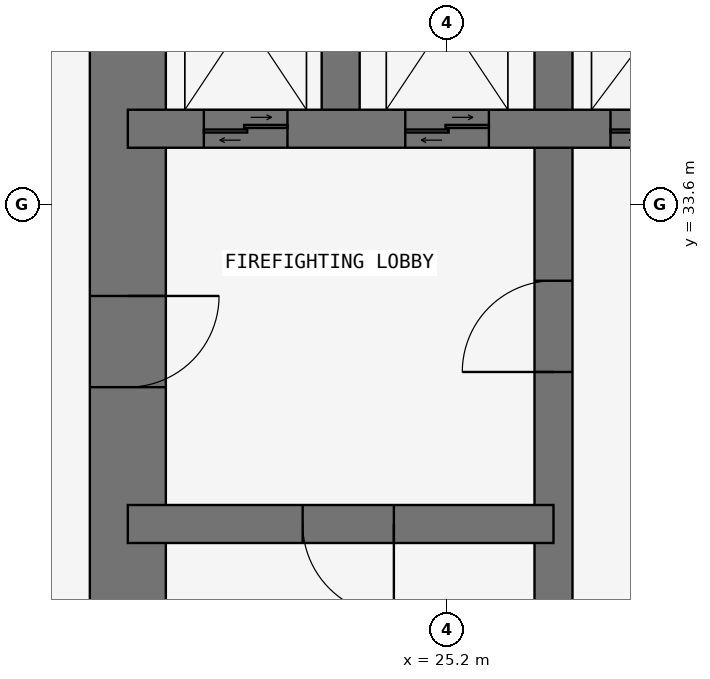
"""IFC4 building model, lengths in metres.
Left out: names, types, materials, properties, quantities, classifications, styles, units other than length and angle.
Written with IfcOpenShell. Run it as: python <this file> out.ifc"""

import sys

from ifc_helpers import new_model, si_unit, direction, frame, frame_2d, origin, place, context, subcontext, project, spatial, rectangle, extrude, element, fill, save


model = new_model("IFC4")
c1 = context("Model", 3, precision=1e-05, world=origin(), true_north=direction((0.0, 1.0)))
c2 = subcontext(c1, "Body", "Model", "MODEL_VIEW")
j1 = project(units=[si_unit("LENGTHUNIT", "METRE"), si_unit("PLANEANGLEUNIT", "RADIAN")], contexts=[c1])
p1 = place(None, origin())
s1 = spatial("IfcSite", under=j1, at=p1, CompositionType="ELEMENT")
p2 = place(p1, origin())
s2 = spatial("IfcBuilding", under=s1, at=p2, CompositionType="ELEMENT")
p3 = place(p2, frame((0.0, 0.0, 84.9)))
s3 = spatial("IfcBuildingStorey", under=s2, at=p3, CompositionType="ELEMENT", Elevation=84.9)
p4 = place(p3, frame((21.0, 37.8, 0.0), z_axis=(0.0, 0.0, 1.0), x_axis=(0.0, -1.0, 0.0)))
e1 = element("IfcWall", 1, at=p4, inside=s3, PredefinedType="SHEAR", context=c2, shape_type="SweptSolid", body=[
    extrude(rectangle(XDim=17.3, YDim=1.0, at=frame_2d((8.65, 0.0))), origin(), (0.0, 0.0, 1.0), 3.6),
])
p5 = place(p4, frame((5.4, 0.0, 0.0)))
e2 = element("IfcOpeningElement", 2, at=p5, cuts=e1, PredefinedType="OPENING", context=c2, shape_type="SweptSolid", body=[
    extrude(rectangle(XDim=1.2, YDim=2.1, at=frame_2d((0.6, 1.05))), frame((0.0, 0.51, 0.0), z_axis=(0.0, -1.0, 0.0), x_axis=(1.0, 0.0, 0.0)), (0.0, 0.0, 1.0), 1.02),
])
p6 = place(p3, frame((26.6, 21.0, 0.0), z_axis=(0.0, 0.0, 1.0), x_axis=(0.0, 1.0, 0.0)))
e3 = element("IfcWall", 3, at=p6, inside=s3, PredefinedType="SHEAR", context=c2, shape_type="SweptSolid", body=[
    extrude(rectangle(XDim=16.8, YDim=0.5, at=frame_2d((8.4, 0.0))), origin(), (0.0, 0.0, 1.0), 3.6),
])
p7 = place(p6, frame((10.4, 0.0, 0.0)))
e4 = element("IfcOpeningElement", 4, at=p7, cuts=e3, PredefinedType="OPENING", context=c2, shape_type="SweptSolid", body=[
    extrude(rectangle(XDim=1.2, YDim=2.1, at=frame_2d((0.6, 1.05))), frame((0.0, 0.26, 0.0), z_axis=(0.0, -1.0, 0.0), x_axis=(1.0, 0.0, 0.0)), (0.0, 0.0, 1.0), 0.52),
])
p8 = place(p3, frame((21.0, 29.4, 0.0), z_axis=(0.0, 0.0, 1.0), x_axis=(1.0, 0.0, 0.0)))
e5 = element("IfcWall", 5, at=p8, inside=s3, PredefinedType="SHEAR", context=c2, shape_type="SweptSolid", body=[
    extrude(rectangle(XDim=5.6, YDim=0.5, at=frame_2d((2.8, 0.0))), origin(), (0.0, 0.0, 1.0), 3.6),
])
p9 = place(p8, frame((2.3, 0.0, 0.0)))
e6 = element("IfcOpeningElement", 6, at=p9, cuts=e5, PredefinedType="OPENING", context=c2, shape_type="SweptSolid", body=[
    extrude(rectangle(XDim=1.2, YDim=2.1, at=frame_2d((0.6, 1.05))), frame((0.0, 0.26, 0.0), z_axis=(0.0, -1.0, 0.0), x_axis=(1.0, 0.0, 0.0)), (0.0, 0.0, 1.0), 0.52),
])
p10 = place(p3, frame((21.0, 34.6, 0.0), z_axis=(0.0, 0.0, 1.0), x_axis=(1.0, 0.0, 0.0)))
e7 = element("IfcWall", 7, at=p10, inside=s3, PredefinedType="SHEAR", context=c2, shape_type="SweptSolid", body=[
    extrude(rectangle(XDim=11.2, YDim=0.5, at=frame_2d((5.6, 0.0))), origin(), (0.0, 0.0, 1.0), 3.6),
])
p11 = place(p10, frame((9.35, 0.0, 0.0)))
e8 = element("IfcOpeningElement", 8, at=p11, cuts=e7, PredefinedType="OPENING", context=c2, shape_type="SweptSolid", body=[
    extrude(rectangle(XDim=0.9, YDim=2.1, at=frame_2d((0.45, 1.05))), frame((0.0, 0.26, 0.0), z_axis=(0.0, -1.0, 0.0), x_axis=(1.0, 0.0, 0.0)), (0.0, 0.0, 1.0), 0.52),
])
p12 = place(p10, frame((1.0, 0.0, 0.0)))
e9 = element("IfcOpeningElement", 9, at=p12, cuts=e7, PredefinedType="OPENING", context=c2, shape_type="SweptSolid", body=[
    extrude(rectangle(XDim=1.1, YDim=2.1, at=frame_2d((0.55, 1.05))), frame((0.0, 0.26, 0.0), z_axis=(0.0, -1.0, 0.0), x_axis=(1.0, 0.0, 0.0)), (0.0, 0.0, 1.0), 0.52),
])
p13 = place(p10, frame((3.65, 0.0, 0.0)))
e10 = element("IfcOpeningElement", 10, at=p13, cuts=e7, PredefinedType="OPENING", context=c2, shape_type="SweptSolid", body=[
    extrude(rectangle(XDim=1.1, YDim=2.1, at=frame_2d((0.55, 1.05))), frame((0.0, 0.26, 0.0), z_axis=(0.0, -1.0, 0.0), x_axis=(1.0, 0.0, 0.0)), (0.0, 0.0, 1.0), 0.52),
])
p14 = place(p10, frame((6.35, 0.0, 0.0)))
e11 = element("IfcOpeningElement", 11, at=p14, cuts=e7, PredefinedType="OPENING", context=c2, shape_type="SweptSolid", body=[
    extrude(rectangle(XDim=1.3, YDim=2.1, at=frame_2d((0.65, 1.05))), frame((0.0, 0.26, 0.0), z_axis=(0.0, -1.0, 0.0), x_axis=(1.0, 0.0, 0.0)), (0.0, 0.0, 1.0), 0.52),
])
p15 = place(p3, frame((23.8, 34.6, 0.0), z_axis=(0.0, 0.0, 1.0), x_axis=(0.0, 1.0, 0.0)))
e12 = element("IfcWall", 12, at=p15, inside=s3, PredefinedType="SHEAR", context=c2, shape_type="SweptSolid", body=[
    extrude(rectangle(XDim=3.2, YDim=0.5, at=frame_2d((1.6, 0.0))), origin(), (0.0, 0.0, 1.0), 3.6),
])
p16 = place(p5, origin())
e13 = element("IfcDoor", 13, at=p16, inside=s3, OperationType="SINGLE_SWING_LEFT", PredefinedType="DOOR", context=c2, shape_type="SweptSolid", body=[
    extrude(rectangle(XDim=1.2, YDim=2.1, at=frame_2d((0.6, 1.05))), frame((0.0, 0.025, 0.0), z_axis=(0.0, -1.0, 0.0), x_axis=(1.0, 0.0, 0.0)), (0.0, 0.0, 1.0), 0.05),
])
fill(e2, e13)
p17 = place(p9, frame((1.2, 0.0, 0.0), z_axis=(0.0, 0.0, 1.0), x_axis=(-1.0, 0.0, 0.0)))
e14 = element("IfcDoor", 14, at=p17, inside=s3, OperationType="SINGLE_SWING_LEFT", PredefinedType="DOOR", context=c2, shape_type="SweptSolid", body=[
    extrude(rectangle(XDim=1.2, YDim=2.1, at=frame_2d((0.6, 1.05))), frame((0.0, 0.025, 0.0), z_axis=(0.0, -1.0, 0.0), x_axis=(1.0, 0.0, 0.0)), (0.0, 0.0, 1.0), 0.05),
])
fill(e6, e14)
p18 = place(p7, origin())
e15 = element("IfcDoor", 15, at=p18, inside=s3, OperationType="SINGLE_SWING_LEFT", PredefinedType="DOOR", context=c2, shape_type="SweptSolid", body=[
    extrude(rectangle(XDim=1.2, YDim=2.1, at=frame_2d((0.6, 1.05))), frame((0.0, 0.025, 0.0), z_axis=(0.0, -1.0, 0.0), x_axis=(1.0, 0.0, 0.0)), (0.0, 0.0, 1.0), 0.05),
])
fill(e4, e15)
p19 = place(p12, origin())
e16 = element("IfcDoor", 16, at=p19, inside=s3, OperationType="DOUBLE_DOOR_SLIDING", PredefinedType="DOOR", context=c2, shape_type="SweptSolid", body=[
    extrude(rectangle(XDim=1.1, YDim=2.1, at=frame_2d((0.55, 1.05))), frame((0.0, 0.025, 0.0), z_axis=(0.0, -1.0, 0.0), x_axis=(1.0, 0.0, 0.0)), (0.0, 0.0, 1.0), 0.05),
])
fill(e9, e16)
p20 = place(p13, origin())
e17 = element("IfcDoor", 17, at=p20, inside=s3, OperationType="DOUBLE_DOOR_SLIDING", PredefinedType="DOOR", context=c2, shape_type="SweptSolid", body=[
    extrude(rectangle(XDim=1.1, YDim=2.1, at=frame_2d((0.55, 1.05))), frame((0.0, 0.025, 0.0), z_axis=(0.0, -1.0, 0.0), x_axis=(1.0, 0.0, 0.0)), (0.0, 0.0, 1.0), 0.05),
])
fill(e10, e17)
p21 = place(p14, origin())
e18 = element("IfcDoor", 18, at=p21, inside=s3, OperationType="DOUBLE_DOOR_SLIDING", PredefinedType="DOOR", context=c2, shape_type="SweptSolid", body=[
    extrude(rectangle(XDim=1.3, YDim=2.1, at=frame_2d((0.65, 1.05))), frame((0.0, 0.025, 0.0), z_axis=(0.0, -1.0, 0.0), x_axis=(1.0, 0.0, 0.0)), (0.0, 0.0, 1.0), 0.05),
])
fill(e11, e18)
save(model, sys.argv[1])
